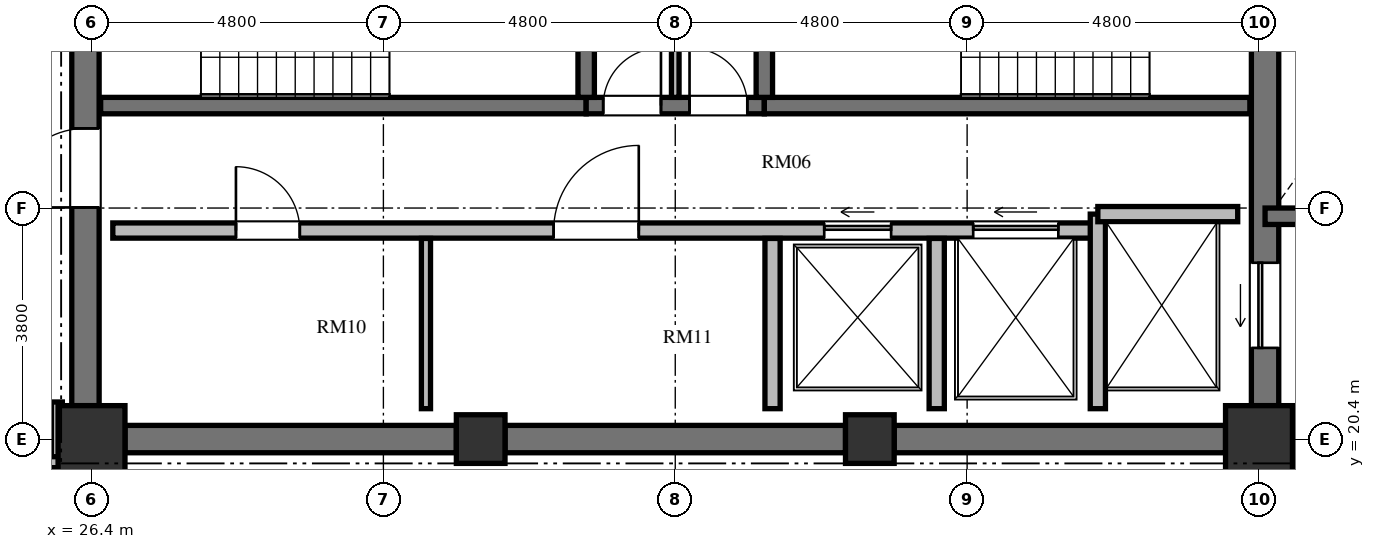
"""IFC4 building model, lengths in metres.
Left out: names, types, materials, properties, quantities, classifications, styles, units other than length and angle.
Written with IfcOpenShell. Run it as: python <this file> out.ifc"""

import sys

from ifc_helpers import new_model, si_unit, direction, frame, frame_2d, origin, origin_2d, place, context, subcontext, project, spatial, rectangle, extrude, element, fill, save


model = new_model("IFC4")
c1 = context("Model", 3, precision=1e-05, world=origin(), true_north=direction((0.0, 1.0)))
c2 = subcontext(c1, "Body", "Model", "MODEL_VIEW")
j1 = project(units=[si_unit("LENGTHUNIT", "METRE"), si_unit("PLANEANGLEUNIT", "RADIAN")], contexts=[c1])
p1 = place(None, origin())
s1 = spatial("IfcSite", under=j1, at=p1, CompositionType="ELEMENT")
p2 = place(p1, origin())
s2 = spatial("IfcBuilding", under=s1, at=p2, CompositionType="ELEMENT")
p3 = place(p2, frame((0.0, 0.0, 262.32)))
s3 = spatial("IfcBuildingStorey", under=s2, at=p3, CompositionType="ELEMENT", Elevation=262.32)
p4 = place(p3, frame((26.4, 20.4, 0.0), z_axis=(0.0, 0.0, 1.0), x_axis=(1.0, 0.0, 0.0)))
e1 = element("IfcColumn", 1, at=p4, inside=s3, PredefinedType="COLUMN", context=c2, shape_type="SweptSolid", body=[
    extrude(rectangle(XDim=1.1, YDim=1.1, at=origin_2d()), origin(), (0.0, 0.0, 1.0), 3.648),
])
for number, where, z_axis, x_axis in (
    (2, (32.8, 20.4, 0.0), (0.0, 0.0, 1.0), (1.0, 0.0, 0.0)),
    (3, (39.2, 20.4, 0.0), (0.0, 0.0, 1.0), (1.0, 0.0, 0.0)),
):
    element("IfcColumn", number, at=place(p3, frame(where, z_axis=z_axis, x_axis=x_axis)), inside=s3, PredefinedType="COLUMN", context=c2, shape_type="SweptSolid", body=[
        extrude(rectangle(XDim=0.8, YDim=0.8, at=origin_2d()), origin(), (0.0, 0.0, 1.0), 3.648),
    ])
p5 = place(p3, frame((45.6, 20.4, 0.0), z_axis=(0.0, 0.0, 1.0), x_axis=(1.0, 0.0, 0.0)))
e4 = element("IfcColumn", 4, at=p5, inside=s3, PredefinedType="COLUMN", context=c2, shape_type="SweptSolid", body=[
    extrude(rectangle(XDim=1.1, YDim=1.1, at=origin_2d()), origin(), (0.0, 0.0, 1.0), 3.648),
])
p6 = place(p3, frame((26.3, 20.95, 0.0), z_axis=(0.0, 0.0, 1.0), x_axis=(0.0, 1.0, 0.0)))
e5 = element("IfcWall", 5, at=p6, inside=s3, PredefinedType="SHEAR", context=c2, shape_type="SweptSolid", body=[
    extrude(rectangle(XDim=14.1, YDim=0.45, at=frame_2d((7.05, 0.0))), origin(), (0.0, 0.0, 1.0), 3.648),
])
p7 = place(p6, frame((6.5, 0.0, 0.0)))
e6 = element("IfcOpeningElement", 6, at=p7, cuts=e5, PredefinedType="OPENING", context=c2, shape_type="SweptSolid", body=[
    extrude(rectangle(XDim=1.2, YDim=2.15, at=frame_2d((0.6, 1.075))), frame((0.0, 0.235, 0.0), z_axis=(0.0, -1.0, 0.0), x_axis=(1.0, 0.0, 0.0)), (0.0, 0.0, 1.0), 0.47),
])
p8 = place(p6, frame((9.6, 0.0, 0.0)))
e7 = element("IfcOpeningElement", 7, at=p8, cuts=e5, PredefinedType="OPENING", context=c2, shape_type="SweptSolid", body=[
    extrude(rectangle(XDim=1.3, YDim=2.2, at=frame_2d((0.65, 1.1))), frame((0.0, 0.235, 0.0), z_axis=(0.0, -1.0, 0.0), x_axis=(1.0, 0.0, 0.0)), (0.0, 0.0, 1.0), 0.47),
])
p9 = place(p6, frame((3.26, 0.0, 0.0)))
e8 = element("IfcOpeningElement", 8, at=p9, cuts=e5, PredefinedType="OPENING", context=c2, shape_type="SweptSolid", body=[
    extrude(rectangle(XDim=1.3, YDim=2.2, at=frame_2d((0.65, 1.1))), frame((0.0, 0.235, 0.0), z_axis=(0.0, -1.0, 0.0), x_axis=(1.0, 0.0, 0.0)), (0.0, 0.0, 1.0), 0.47),
])
p10 = place(p3, frame((45.7, 20.95, 0.0), z_axis=(0.0, 0.0, 1.0), x_axis=(0.0, 1.0, 0.0)))
e9 = element("IfcWall", 9, at=p10, inside=s3, PredefinedType="SHEAR", context=c2, shape_type="SweptSolid", body=[
    extrude(rectangle(XDim=14.1, YDim=0.45, at=frame_2d((7.05, 0.0))), origin(), (0.0, 0.0, 1.0), 3.648),
])
p11 = place(p10, frame((11.75, 0.0, 0.0)))
e10 = element("IfcOpeningElement", 10, at=p11, cuts=e9, PredefinedType="OPENING", context=c2, shape_type="SweptSolid", body=[
    extrude(rectangle(XDim=1.4, YDim=2.3, at=frame_2d((0.7, 1.15))), frame((0.0, 0.235, 0.0), z_axis=(0.0, -1.0, 0.0), x_axis=(1.0, 0.0, 0.0)), (0.0, 0.0, 1.0), 0.47),
])
p12 = place(p10, frame((0.95, 0.0, 0.0)))
e11 = element("IfcOpeningElement", 11, at=p12, cuts=e9, PredefinedType="OPENING", context=c2, shape_type="SweptSolid", body=[
    extrude(rectangle(XDim=1.4, YDim=2.3, at=frame_2d((0.7, 1.15))), frame((0.0, 0.235, 0.0), z_axis=(0.0, -1.0, 0.0), x_axis=(1.0, 0.0, 0.0)), (0.0, 0.0, 1.0), 0.47),
])
p13 = place(p3, frame((26.95, 20.4, 0.0), z_axis=(0.0, 0.0, 1.0), x_axis=(1.0, 0.0, 0.0)))
e12 = element("IfcWall", 12, at=p13, inside=s3, PredefinedType="SHEAR", context=c2, shape_type="SweptSolid", body=[
    extrude(rectangle(XDim=5.45, YDim=0.45, at=frame_2d((2.725, 0.0))), origin(), (0.0, 0.0, 1.0), 3.648),
])
p14 = place(p3, frame((33.2, 20.4, 0.0), z_axis=(0.0, 0.0, 1.0), x_axis=(1.0, 0.0, 0.0)))
e13 = element("IfcWall", 13, at=p14, inside=s3, PredefinedType="SHEAR", context=c2, shape_type="SweptSolid", body=[
    extrude(rectangle(XDim=5.6, YDim=0.45, at=frame_2d((2.8, 0.0))), origin(), (0.0, 0.0, 1.0), 3.648),
])
p15 = place(p3, frame((39.6, 20.4, 0.0), z_axis=(0.0, 0.0, 1.0), x_axis=(1.0, 0.0, 0.0)))
e14 = element("IfcWall", 14, at=p15, inside=s3, PredefinedType="SHEAR", context=c2, shape_type="SweptSolid", body=[
    extrude(rectangle(XDim=5.45, YDim=0.45, at=frame_2d((2.725, 0.0))), origin(), (0.0, 0.0, 1.0), 3.648),
])
p16 = place(p3, frame((26.55, 25.885, 0.0), z_axis=(0.0, 0.0, 1.0), x_axis=(1.0, 0.0, 0.0)))
e15 = element("IfcWall", 15, at=p16, inside=s3, PredefinedType="SHEAR", context=c2, shape_type="SweptSolid", body=[
    extrude(rectangle(XDim=7.985, YDim=0.27, at=frame_2d((3.992, 0.0))), origin(), (0.0, 0.0, 1.0), 3.648),
])
p17 = place(p3, frame((34.535, 25.885, 0.0), z_axis=(0.0, 0.0, 1.0), x_axis=(1.0, 0.0, 0.0)))
e16 = element("IfcWall", 16, at=p17, inside=s3, PredefinedType="SHEAR", context=c2, shape_type="SweptSolid", body=[
    extrude(rectangle(XDim=2.93, YDim=0.27, at=frame_2d((1.465, 0.0))), origin(), (0.0, 0.0, 1.0), 3.648),
])
p18 = place(p17, frame((0.28, 0.0, 0.0)))
e17 = element("IfcOpeningElement", 17, at=p18, cuts=e16, PredefinedType="OPENING", context=c2, shape_type="SweptSolid", body=[
    extrude(rectangle(XDim=0.95, YDim=2.1, at=frame_2d((0.475, 1.05))), frame((0.0, 0.145, 0.0), z_axis=(0.0, -1.0, 0.0), x_axis=(1.0, 0.0, 0.0)), (0.0, 0.0, 1.0), 0.29),
])
p19 = place(p17, frame((1.7, 0.0, 0.0)))
e18 = element("IfcOpeningElement", 18, at=p19, cuts=e16, PredefinedType="OPENING", context=c2, shape_type="SweptSolid", body=[
    extrude(rectangle(XDim=0.95, YDim=2.1, at=frame_2d((0.475, 1.05))), frame((0.0, 0.145, 0.0), z_axis=(0.0, -1.0, 0.0), x_axis=(1.0, 0.0, 0.0)), (0.0, 0.0, 1.0), 0.29),
])
p20 = place(p3, frame((37.465, 25.885, 0.0), z_axis=(0.0, 0.0, 1.0), x_axis=(1.0, 0.0, 0.0)))
e19 = element("IfcWall", 19, at=p20, inside=s3, PredefinedType="SHEAR", context=c2, shape_type="SweptSolid", body=[
    extrude(rectangle(XDim=7.985, YDim=0.27, at=frame_2d((3.992, 0.0))), origin(), (0.0, 0.0, 1.0), 3.648),
])
for number, where, z_axis, x_axis in (
    (20, (34.535, 26.02, 0.0), (0.0, 0.0, 1.0), (0.0, 1.0, 0.0)),
    (21, (37.465, 26.02, 0.0), (0.0, 0.0, 1.0), (0.0, 1.0, 0.0)),
):
    element("IfcWall", number, at=place(p3, frame(where, z_axis=z_axis, x_axis=x_axis)), inside=s3, PredefinedType="SHEAR", context=c2, shape_type="SweptSolid", body=[
        extrude(rectangle(XDim=4.08, YDim=0.27, at=frame_2d((2.04, 0.0))), origin(), (0.0, 0.0, 1.0), 3.648),
    ])
p21 = place(p3, frame((36.0, 26.02, 0.0), z_axis=(0.0, 0.0, 1.0), x_axis=(0.0, 1.0, 0.0)))
e22 = element("IfcWall", 22, at=p21, inside=s3, PredefinedType="PARTITIONING", context=c2, shape_type="SweptSolid", body=[
    extrude(rectangle(XDim=4.08, YDim=0.125, at=frame_2d((2.04, 0.0))), origin(), (0.0, 0.0, 1.0), 3.448),
])
p22 = place(p3, frame((26.75, 23.83, 0.0), z_axis=(0.0, 0.0, 1.0), x_axis=(1.0, 0.0, 0.0)))
e23 = element("IfcWall", 23, at=p22, inside=s3, PredefinedType="SOLIDWALL", context=c2, shape_type="SweptSolid", body=[
    extrude(rectangle(XDim=16.2, YDim=0.25, at=frame_2d((8.1, 0.0))), origin(), (0.0, 0.0, 1.0), 3.448),
])
p23 = place(p22, frame((2.025, 0.0, 0.0)))
e24 = element("IfcOpeningElement", 24, at=p23, cuts=e23, PredefinedType="OPENING", context=c2, shape_type="SweptSolid", body=[
    extrude(rectangle(XDim=1.05, YDim=2.15, at=frame_2d((0.525, 1.075))), frame((0.0, 0.135, 0.0), z_axis=(0.0, -1.0, 0.0), x_axis=(1.0, 0.0, 0.0)), (0.0, 0.0, 1.0), 0.27),
])
p24 = place(p22, frame((7.25, 0.0, 0.0)))
e25 = element("IfcOpeningElement", 25, at=p24, cuts=e23, PredefinedType="OPENING", context=c2, shape_type="SweptSolid", body=[
    extrude(rectangle(XDim=1.4, YDim=2.2, at=frame_2d((0.7, 1.1))), frame((0.0, 0.135, 0.0), z_axis=(0.0, -1.0, 0.0), x_axis=(1.0, 0.0, 0.0)), (0.0, 0.0, 1.0), 0.27),
])
p25 = place(p22, frame((11.7, 0.0, 0.0)))
e26 = element("IfcOpeningElement", 26, at=p25, cuts=e23, PredefinedType="OPENING", context=c2, shape_type="SweptSolid", body=[
    extrude(rectangle(XDim=1.1, YDim=2.2, at=frame_2d((0.55, 1.1))), frame((0.0, 0.135, 0.0), z_axis=(0.0, -1.0, 0.0), x_axis=(1.0, 0.0, 0.0)), (0.0, 0.0, 1.0), 0.27),
])
p26 = place(p22, frame((14.15, 0.0, 0.0)))
e27 = element("IfcOpeningElement", 27, at=p26, cuts=e23, PredefinedType="OPENING", context=c2, shape_type="SweptSolid", body=[
    extrude(rectangle(XDim=1.4, YDim=2.3, at=frame_2d((0.7, 1.15))), frame((0.0, 0.135, 0.0), z_axis=(0.0, -1.0, 0.0), x_axis=(1.0, 0.0, 0.0)), (0.0, 0.0, 1.0), 0.27),
])
p27 = place(p3, frame((42.95, 20.9, 0.0), z_axis=(0.0, 0.0, 1.0), x_axis=(0.0, 1.0, 0.0)))
e28 = element("IfcWall", 28, at=p27, inside=s3, PredefinedType="SOLIDWALL", context=c2, shape_type="SweptSolid", body=[
    extrude(rectangle(XDim=3.2, YDim=0.25, at=frame_2d((1.6, 0.0))), origin(), (0.0, 0.0, 1.0), 3.448),
])
p28 = place(p3, frame((42.95, 24.1, 0.0), z_axis=(0.0, 0.0, 1.0), x_axis=(1.0, 0.0, 0.0)))
e29 = element("IfcWall", 29, at=p28, inside=s3, PredefinedType="SOLIDWALL", context=c2, shape_type="SweptSolid", body=[
    extrude(rectangle(XDim=2.3, YDim=0.25, at=frame_2d((1.15, 0.0))), origin(), (0.0, 0.0, 1.0), 3.448),
])
for number, where, z_axis, x_axis in (
    (30, (37.6, 20.9, 0.0), (0.0, 0.0, 1.0), (0.0, 1.0, 0.0)),
    (31, (40.3, 20.9, 0.0), (0.0, 0.0, 1.0), (0.0, 1.0, 0.0)),
):
    element("IfcWall", number, at=place(p3, frame(where, z_axis=z_axis, x_axis=x_axis)), inside=s3, PredefinedType="SOLIDWALL", context=c2, shape_type="SweptSolid", body=[
        extrude(rectangle(XDim=2.8, YDim=0.25, at=frame_2d((1.4, 0.0))), origin(), (0.0, 0.0, 1.0), 3.448),
    ])
p29 = place(p3, frame((31.9, 20.9, 0.0), z_axis=(0.0, 0.0, 1.0), x_axis=(0.0, 1.0, 0.0)))
e32 = element("IfcWall", 32, at=p29, inside=s3, PredefinedType="PARTITIONING", context=c2, shape_type="SweptSolid", body=[
    extrude(rectangle(XDim=2.8, YDim=0.15, at=frame_2d((1.4, 0.0))), origin(), (0.0, 0.0, 1.0), 3.448),
])
p30 = place(p3, frame((45.7, 24.065, 0.0), z_axis=(0.0, 0.0, 1.0), x_axis=(1.0, 0.0, 0.0)))
e33 = element("IfcWall", 33, at=p30, inside=s3, PredefinedType="SHEAR", context=c2, shape_type="SweptSolid", body=[
    extrude(rectangle(XDim=4.715, YDim=0.27, at=frame_2d((2.357, 0.0))), origin(), (0.0, 0.0, 1.0), 3.648),
])
p31 = place(p3, frame((45.7, 20.02, 0.0), z_axis=(0.0, 0.0, 1.0), x_axis=(1.0, 0.0, 0.0)))
e34 = element("IfcWall", 34, at=p31, inside=s3, PredefinedType="SOLIDWALL", context=c2, shape_type="SweptSolid", body=[
    extrude(rectangle(XDim=4.715, YDim=0.25, at=frame_2d((2.357, 0.0))), origin(), (0.0, 0.0, 1.0), 3.448),
])
p32 = place(p3, frame((25.83, 21.01, 0.0), z_axis=(0.0, 0.0, 1.0), x_axis=(0.0, -1.0, 0.0)))
e35 = element("IfcWall", 35, at=p32, inside=s3, PredefinedType="PARTITIONING", context=c2, shape_type="SweptSolid", body=[
    extrude(rectangle(XDim=1.03, YDim=0.18, at=frame_2d((0.515, 0.0))), origin(), (0.0, 0.0, 1.0), 3.448),
])
p33 = place(p3, frame((25.87, 20.02, 0.0), z_axis=(0.0, 0.0, 1.0), x_axis=(-1.0, 0.0, 0.0)))
e36 = element("IfcWall", 36, at=p33, inside=s3, PredefinedType="PARTITIONING", context=c2, shape_type="SweptSolid", body=[
    extrude(rectangle(XDim=2.56, YDim=0.18, at=frame_2d((1.28, 0.0))), origin(), (0.0, 0.0, 1.0), 3.448),
])
p34 = place(p18, origin())
e37 = element("IfcDoor", 37, at=p34, inside=s3, OperationType="SINGLE_SWING_RIGHT", PredefinedType="DOOR", context=c2, shape_type="SweptSolid", body=[
    extrude(rectangle(XDim=0.95, YDim=2.1, at=frame_2d((0.475, 1.05))), frame((0.0, 0.025, 0.0), z_axis=(0.0, -1.0, 0.0), x_axis=(1.0, 0.0, 0.0)), (0.0, 0.0, 1.0), 0.05),
])
fill(e17, e37)
p35 = place(p19, origin())
e38 = element("IfcDoor", 38, at=p35, inside=s3, OperationType="SINGLE_SWING_LEFT", PredefinedType="DOOR", context=c2, shape_type="SweptSolid", body=[
    extrude(rectangle(XDim=0.95, YDim=2.1, at=frame_2d((0.475, 1.05))), frame((0.0, 0.025, 0.0), z_axis=(0.0, -1.0, 0.0), x_axis=(1.0, 0.0, 0.0)), (0.0, 0.0, 1.0), 0.05),
])
fill(e18, e38)
p36 = place(p9, origin())
e39 = element("IfcDoor", 39, at=p36, inside=s3, OperationType="SINGLE_SWING_LEFT", PredefinedType="DOOR", context=c2, shape_type="SweptSolid", body=[
    extrude(rectangle(XDim=1.3, YDim=2.2, at=frame_2d((0.65, 1.1))), frame((0.0, 0.025, 0.0), z_axis=(0.0, -1.0, 0.0), x_axis=(1.0, 0.0, 0.0)), (0.0, 0.0, 1.0), 0.05),
])
fill(e8, e39)
p37 = place(p23, origin())
e40 = element("IfcDoor", 40, at=p37, inside=s3, OperationType="SINGLE_SWING_LEFT", PredefinedType="DOOR", context=c2, shape_type="SweptSolid", body=[
    extrude(rectangle(XDim=1.05, YDim=2.15, at=frame_2d((0.525, 1.075))), frame((0.0, 0.025, 0.0), z_axis=(0.0, -1.0, 0.0), x_axis=(1.0, 0.0, 0.0)), (0.0, 0.0, 1.0), 0.05),
])
fill(e24, e40)
p38 = place(p24, origin())
e41 = element("IfcDoor", 41, at=p38, inside=s3, OperationType="SINGLE_SWING_RIGHT", PredefinedType="DOOR", context=c2, shape_type="SweptSolid", body=[
    extrude(rectangle(XDim=1.4, YDim=2.2, at=frame_2d((0.7, 1.1))), frame((0.0, 0.025, 0.0), z_axis=(0.0, -1.0, 0.0), x_axis=(1.0, 0.0, 0.0)), (0.0, 0.0, 1.0), 0.05),
])
fill(e25, e41)
p39 = place(p25, origin())
e42 = element("IfcDoor", 42, at=p39, inside=s3, OperationType="SLIDING_TO_LEFT", PredefinedType="DOOR", context=c2, shape_type="SweptSolid", body=[
    extrude(rectangle(XDim=1.1, YDim=2.2, at=frame_2d((0.55, 1.1))), frame((0.0, 0.025, 0.0), z_axis=(0.0, -1.0, 0.0), x_axis=(1.0, 0.0, 0.0)), (0.0, 0.0, 1.0), 0.05),
])
fill(e26, e42)
p40 = place(p12, origin())
e43 = element("IfcDoor", 43, at=p40, inside=s3, OperationType="SLIDING_TO_LEFT", PredefinedType="DOOR", context=c2, shape_type="SweptSolid", body=[
    extrude(rectangle(XDim=1.4, YDim=2.3, at=frame_2d((0.7, 1.15))), frame((0.0, 0.025, 0.0), z_axis=(0.0, -1.0, 0.0), x_axis=(1.0, 0.0, 0.0)), (0.0, 0.0, 1.0), 0.05),
])
fill(e11, e43)
p41 = place(p26, origin())
e44 = element("IfcDoor", 44, at=p41, inside=s3, OperationType="SLIDING_TO_LEFT", PredefinedType="DOOR", context=c2, shape_type="SweptSolid", body=[
    extrude(rectangle(XDim=1.4, YDim=2.3, at=frame_2d((0.7, 1.15))), frame((0.0, 0.025, 0.0), z_axis=(0.0, -1.0, 0.0), x_axis=(1.0, 0.0, 0.0)), (0.0, 0.0, 1.0), 0.05),
])
fill(e27, e44)
save(model, sys.argv[1])
